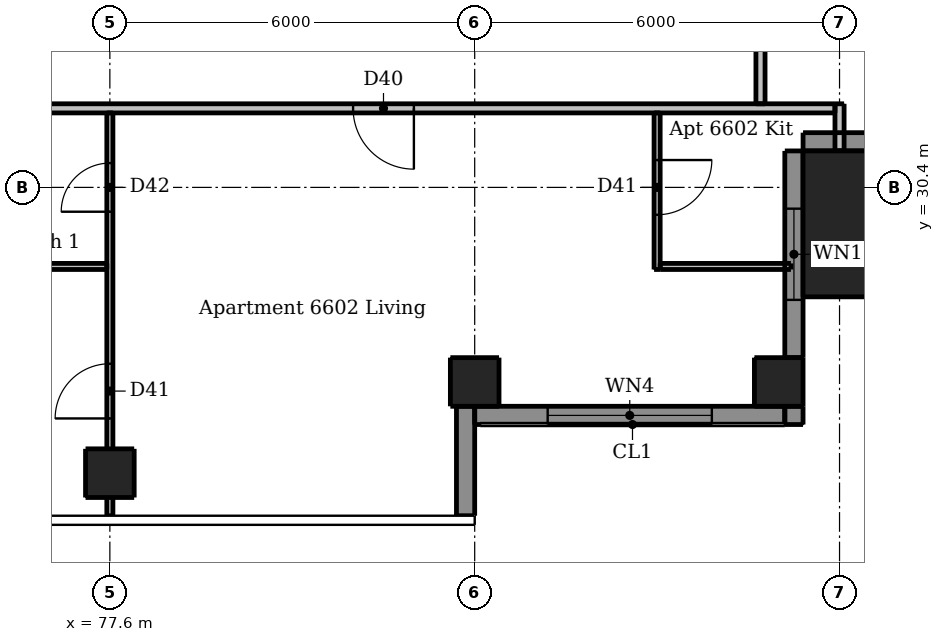
"""IFC4 building model, lengths in metres.
Left out: names, types, materials, properties, quantities, classifications, styles, units other than length and angle.
Written with IfcOpenShell. Run it as: python <this file> out.ifc"""

import sys

from ifc_helpers import new_model, si_unit, direction, frame, frame_2d, origin, origin_2d, place, context, subcontext, project, spatial, rectangle, extrude, element, fill, save


model = new_model("IFC4")
c1 = context("Model", 3, precision=1e-05, world=origin(), true_north=direction((0.0, 1.0)))
c2 = subcontext(c1, "Body", "Model", "MODEL_VIEW")
j1 = project(units=[si_unit("LENGTHUNIT", "METRE"), si_unit("PLANEANGLEUNIT", "RADIAN")], contexts=[c1])
p1 = place(None, origin())
s1 = spatial("IfcSite", under=j1, at=p1, CompositionType="ELEMENT")
p2 = place(p1, origin())
s2 = spatial("IfcBuilding", under=s1, at=p2, CompositionType="ELEMENT")
p3 = place(p2, frame((0.0, 0.0, 248.8)))
s3 = spatial("IfcBuildingStorey", under=s2, at=p3, CompositionType="ELEMENT", Elevation=248.8)
for number, where, z_axis, x_axis in (
    (1, (77.6, 25.7, 0.0), (0.0, 0.0, 1.0), (1.0, 0.0, 0.0)),
    (2, (83.6, 27.2, 0.0), (0.0, 0.0, 1.0), (1.0, 0.0, 0.0)),
    (3, (88.6, 27.2, 0.0), (0.0, 0.0, 1.0), (1.0, 0.0, 0.0)),
):
    element("IfcColumn", number, at=place(p3, frame(where, z_axis=z_axis, x_axis=x_axis)), inside=s3, PredefinedType="COLUMN", context=c2, shape_type="SweptSolid", body=[
        extrude(rectangle(XDim=0.8, YDim=0.8, at=origin_2d()), origin(), (0.0, 0.0, 1.0), 3.05),
    ])
p4 = place(p3, frame((90.2, 29.8, 0.0), z_axis=(0.0, 0.0, 1.0), x_axis=(1.0, 0.0, 0.0)))
e4 = element("IfcColumn", 4, at=p4, inside=s3, PredefinedType="COLUMN", context=c2, shape_type="SweptSolid", body=[
    extrude(rectangle(XDim=2.4, YDim=2.4, at=origin_2d()), origin(), (0.0, 0.0, 1.0), 3.3),
])
p5 = place(p3, frame((83.45, 25.0, 0.0), z_axis=(0.0, 0.0, 1.0), x_axis=(0.0, 1.0, 0.0)))
e5 = element("IfcWall", 5, at=p5, inside=s3, PredefinedType="SOLIDWALL", context=c2, shape_type="SweptSolid", body=[
    extrude(rectangle(XDim=1.8, YDim=0.3, at=frame_2d((0.9, 0.0))), origin(), (0.0, 0.0, 1.0), 3.05),
])
p6 = place(p3, frame((88.85, 26.5, 0.0), z_axis=(0.0, 0.0, 1.0), x_axis=(0.0, 1.0, 0.0)))
e6 = element("IfcWall", 6, at=p6, inside=s3, PredefinedType="SOLIDWALL", context=c2, shape_type="SweptSolid", body=[
    extrude(rectangle(XDim=0.3, YDim=0.3, at=frame_2d((0.15, 0.0))), origin(), (0.0, 0.0, 1.0), 3.05),
])
p7 = place(p3, frame((88.85, 27.6, 0.0), z_axis=(0.0, 0.0, 1.0), x_axis=(0.0, 1.0, 0.0)))
e7 = element("IfcWall", 7, at=p7, inside=s3, PredefinedType="SOLIDWALL", context=c2, shape_type="SweptSolid", body=[
    extrude(rectangle(XDim=3.4, YDim=0.3, at=frame_2d((1.7, 0.0))), origin(), (0.0, 0.0, 1.0), 3.05),
])
p8 = place(p7, frame((0.95, 0.0, 0.9)))
e8 = element("IfcOpeningElement", 8, at=p8, cuts=e7, PredefinedType="OPENING", context=c2, shape_type="SweptSolid", body=[
    extrude(rectangle(XDim=1.5, YDim=1.5, at=frame_2d((0.75, 0.75))), frame((0.0, 0.16, 0.0), z_axis=(0.0, -1.0, 0.0), x_axis=(1.0, 0.0, 0.0)), (0.0, 0.0, 1.0), 0.32),
])
p9 = place(p3, frame((89.0, 31.15, 0.0), z_axis=(0.0, 0.0, 1.0), x_axis=(1.0, 0.0, 0.0)))
e9 = element("IfcWall", 9, at=p9, inside=s3, PredefinedType="SOLIDWALL", context=c2, shape_type="SweptSolid", body=[
    extrude(rectangle(XDim=3.4, YDim=0.3, at=frame_2d((1.7, 0.0))), origin(), (0.0, 0.0, 1.0), 3.05),
])
p10 = place(p3, frame((83.6, 26.65, 0.0), z_axis=(0.0, 0.0, 1.0), x_axis=(1.0, 0.0, 0.0)))
e10 = element("IfcWall", 10, at=p10, inside=s3, PredefinedType="SOLIDWALL", context=c2, shape_type="SweptSolid", body=[
    extrude(rectangle(XDim=5.1, YDim=0.3, at=frame_2d((2.55, 0.0))), origin(), (0.0, 0.0, 1.0), 3.05),
])
p11 = place(p10, frame((1.2, 0.0, 0.15)))
e11 = element("IfcOpeningElement", 11, at=p11, cuts=e10, PredefinedType="OPENING", context=c2, shape_type="SweptSolid", body=[
    extrude(rectangle(XDim=2.7, YDim=2.1, at=frame_2d((1.35, 1.05))), frame((0.0, 0.16, 0.0), z_axis=(0.0, -1.0, 0.0), x_axis=(1.0, 0.0, 0.0)), (0.0, 0.0, 1.0), 0.32),
])
p12 = place(p3, frame((77.6, 25.0, 0.0), z_axis=(0.0, 0.0, 1.0), x_axis=(0.0, 1.0, 0.0)))
e12 = element("IfcWall", 12, at=p12, inside=s3, PredefinedType="PARTITIONING", context=c2, shape_type="SweptSolid", body=[
    extrude(rectangle(XDim=6.625, YDim=0.1, at=frame_2d((3.312, 0.0))), origin(), (0.0, 0.0, 1.0), 2.59),
])
p13 = place(p12, frame((1.6, 0.0, 0.0)))
e13 = element("IfcOpeningElement", 13, at=p13, cuts=e12, PredefinedType="OPENING", context=c2, shape_type="SweptSolid", body=[
    extrude(rectangle(XDim=0.9, YDim=2.1, at=frame_2d((0.45, 1.05))), frame((0.0, 0.06, 0.0), z_axis=(0.0, -1.0, 0.0), x_axis=(1.0, 0.0, 0.0)), (0.0, 0.0, 1.0), 0.12),
])
p14 = place(p12, frame((5.0, 0.0, 0.0)))
e14 = element("IfcOpeningElement", 14, at=p14, cuts=e12, PredefinedType="OPENING", context=c2, shape_type="SweptSolid", body=[
    extrude(rectangle(XDim=0.8, YDim=2.1, at=frame_2d((0.4, 1.05))), frame((0.0, 0.06, 0.0), z_axis=(0.0, -1.0, 0.0), x_axis=(1.0, 0.0, 0.0)), (0.0, 0.0, 1.0), 0.12),
])
p15 = place(p3, frame((86.6, 31.625, 0.0), z_axis=(0.0, 0.0, 1.0), x_axis=(0.0, -1.0, 0.0)))
e15 = element("IfcWall", 15, at=p15, inside=s3, PredefinedType="PARTITIONING", context=c2, shape_type="SweptSolid", body=[
    extrude(rectangle(XDim=2.575, YDim=0.1, at=frame_2d((1.288, 0.0))), origin(), (0.0, 0.0, 1.0), 3.05),
])
p16 = place(p15, frame((0.775, 0.0, 0.0)))
e16 = element("IfcOpeningElement", 16, at=p16, cuts=e15, PredefinedType="OPENING", context=c2, shape_type="SweptSolid", body=[
    extrude(rectangle(XDim=0.9, YDim=2.1, at=frame_2d((0.45, 1.05))), frame((0.0, 0.06, 0.0), z_axis=(0.0, -1.0, 0.0), x_axis=(1.0, 0.0, 0.0)), (0.0, 0.0, 1.0), 0.12),
])
p17 = place(p3, frame((74.05, 29.1, 0.0), z_axis=(0.0, 0.0, 1.0), x_axis=(1.0, 0.0, 0.0)))
e17 = element("IfcWall", 17, at=p17, inside=s3, PredefinedType="PARTITIONING", context=c2, shape_type="SweptSolid", body=[
    extrude(rectangle(XDim=3.5, YDim=0.1, at=frame_2d((1.75, 0.0))), origin(), (0.0, 0.0, 1.0), 3.05),
])
p18 = place(p3, frame((86.65, 29.1, 0.0), z_axis=(0.0, 0.0, 1.0), x_axis=(1.0, 0.0, 0.0)))
e18 = element("IfcWall", 18, at=p18, inside=s3, PredefinedType="PARTITIONING", context=c2, shape_type="SweptSolid", body=[
    extrude(rectangle(XDim=2.15, YDim=0.1, at=frame_2d((1.075, 0.0))), origin(), (0.0, 0.0, 1.0), 3.05),
])
p19 = place(p3, frame((88.3, 61.175, 0.0), z_axis=(0.0, 0.0, 1.0), x_axis=(0.0, -1.0, 0.0)))
e19 = element("IfcWall", 19, at=p19, inside=s3, PredefinedType="PARTITIONING", context=c2, shape_type="SweptSolid", body=[
    extrude(rectangle(XDim=29.4, YDim=0.15, at=frame_2d((14.7, 0.0))), origin(), (0.0, 0.0, 1.0), 3.05),
])
p20 = place(p19, frame((27.025, 0.0, 0.0)))
e20 = element("IfcOpeningElement", 20, at=p20, cuts=e19, PredefinedType="OPENING", context=c2, shape_type="SweptSolid", body=[
    extrude(rectangle(XDim=1.0, YDim=2.1, at=frame_2d((0.5, 1.05))), frame((0.0, 0.085, 0.0), z_axis=(0.0, -1.0, 0.0), x_axis=(1.0, 0.0, 0.0)), (0.0, 0.0, 1.0), 0.17),
])
p21 = place(p19, frame((9.275, 0.0, 0.0)))
e21 = element("IfcOpeningElement", 21, at=p21, cuts=e19, PredefinedType="OPENING", context=c2, shape_type="SweptSolid", body=[
    extrude(rectangle(XDim=1.0, YDim=2.1, at=frame_2d((0.5, 1.05))), frame((0.0, 0.085, 0.0), z_axis=(0.0, -1.0, 0.0), x_axis=(1.0, 0.0, 0.0)), (0.0, 0.0, 1.0), 0.17),
])
p22 = place(p3, frame((89.6, 31.0, 0.0), z_axis=(0.0, 0.0, 1.0), x_axis=(0.0, 1.0, 0.0)))
e22 = element("IfcWall", 22, at=p22, inside=s3, PredefinedType="PARTITIONING", context=c2, shape_type="SweptSolid", body=[
    extrude(rectangle(XDim=0.775, YDim=0.15, at=frame_2d((0.387, 0.0))), origin(), (0.0, 0.0, 1.0), 3.05),
])
p23 = place(p3, frame((89.525, 31.7, 0.0), z_axis=(0.0, 0.0, 1.0), x_axis=(-1.0, 0.0, 0.0)))
e23 = element("IfcWall", 23, at=p23, inside=s3, PredefinedType="PARTITIONING", context=c2, shape_type="SweptSolid", body=[
    extrude(rectangle(XDim=30.55, YDim=0.15, at=frame_2d((15.275, 0.0))), origin(), (0.0, 0.0, 1.0), 3.05),
])
p24 = place(p23, frame((26.775, 0.0, 0.0)))
e24 = element("IfcOpeningElement", 24, at=p24, cuts=e23, PredefinedType="OPENING", context=c2, shape_type="SweptSolid", body=[
    extrude(rectangle(XDim=1.0, YDim=2.1, at=frame_2d((0.5, 1.05))), frame((0.0, 0.085, 0.0), z_axis=(0.0, -1.0, 0.0), x_axis=(1.0, 0.0, 0.0)), (0.0, 0.0, 1.0), 0.17),
])
p25 = place(p23, frame((6.925, 0.0, 0.0)))
e25 = element("IfcOpeningElement", 25, at=p25, cuts=e23, PredefinedType="OPENING", context=c2, shape_type="SweptSolid", body=[
    extrude(rectangle(XDim=1.0, YDim=2.1, at=frame_2d((0.5, 1.05))), frame((0.0, 0.085, 0.0), z_axis=(0.0, -1.0, 0.0), x_axis=(1.0, 0.0, 0.0)), (0.0, 0.0, 1.0), 0.17),
])
p26 = place(p8, origin())
e26 = element("IfcWindow", 26, at=p26, inside=s3, PartitioningType="DOUBLE_PANEL_VERTICAL", PredefinedType="WINDOW", context=c2, shape_type="SweptSolid", body=[
    extrude(rectangle(XDim=1.5, YDim=1.5, at=frame_2d((0.75, 0.75))), frame((0.0, 0.03, 0.0), z_axis=(0.0, -1.0, 0.0), x_axis=(1.0, 0.0, 0.0)), (0.0, 0.0, 1.0), 0.06),
])
fill(e8, e26)
p27 = place(p11, origin())
e27 = element("IfcWindow", 27, at=p27, inside=s3, PartitioningType="DOUBLE_PANEL_VERTICAL", PredefinedType="WINDOW", context=c2, shape_type="SweptSolid", body=[
    extrude(rectangle(XDim=2.7, YDim=2.1, at=frame_2d((1.35, 1.05))), frame((0.0, 0.03, 0.0), z_axis=(0.0, -1.0, 0.0), x_axis=(1.0, 0.0, 0.0)), (0.0, 0.0, 1.0), 0.06),
])
fill(e11, e27)
p28 = place(p25, origin())
e28 = element("IfcDoor", 28, at=p28, inside=s3, OperationType="SINGLE_SWING_LEFT", PredefinedType="DOOR", context=c2, shape_type="SweptSolid", body=[
    extrude(rectangle(XDim=1.0, YDim=2.1, at=frame_2d((0.5, 1.05))), frame((0.0, 0.025, 0.0), z_axis=(0.0, -1.0, 0.0), x_axis=(1.0, 0.0, 0.0)), (0.0, 0.0, 1.0), 0.05),
])
fill(e25, e28)
p29 = place(p16, origin())
e29 = element("IfcDoor", 29, at=p29, inside=s3, OperationType="SINGLE_SWING_LEFT", PredefinedType="DOOR", context=c2, shape_type="SweptSolid", body=[
    extrude(rectangle(XDim=0.9, YDim=2.1, at=frame_2d((0.45, 1.05))), frame((0.0, 0.025, 0.0), z_axis=(0.0, -1.0, 0.0), x_axis=(1.0, 0.0, 0.0)), (0.0, 0.0, 1.0), 0.05),
])
fill(e16, e29)
p30 = place(p13, origin())
e30 = element("IfcDoor", 30, at=p30, inside=s3, OperationType="SINGLE_SWING_LEFT", PredefinedType="DOOR", context=c2, shape_type="SweptSolid", body=[
    extrude(rectangle(XDim=0.9, YDim=2.1, at=frame_2d((0.45, 1.05))), frame((0.0, 0.025, 0.0), z_axis=(0.0, -1.0, 0.0), x_axis=(1.0, 0.0, 0.0)), (0.0, 0.0, 1.0), 0.05),
])
fill(e13, e30)
p31 = place(p14, origin())
e31 = element("IfcDoor", 31, at=p31, inside=s3, OperationType="SINGLE_SWING_LEFT", PredefinedType="DOOR", context=c2, shape_type="SweptSolid", body=[
    extrude(rectangle(XDim=0.8, YDim=2.1, at=frame_2d((0.4, 1.05))), frame((0.0, 0.025, 0.0), z_axis=(0.0, -1.0, 0.0), x_axis=(1.0, 0.0, 0.0)), (0.0, 0.0, 1.0), 0.05),
])
fill(e14, e31)
save(model, sys.argv[1])
